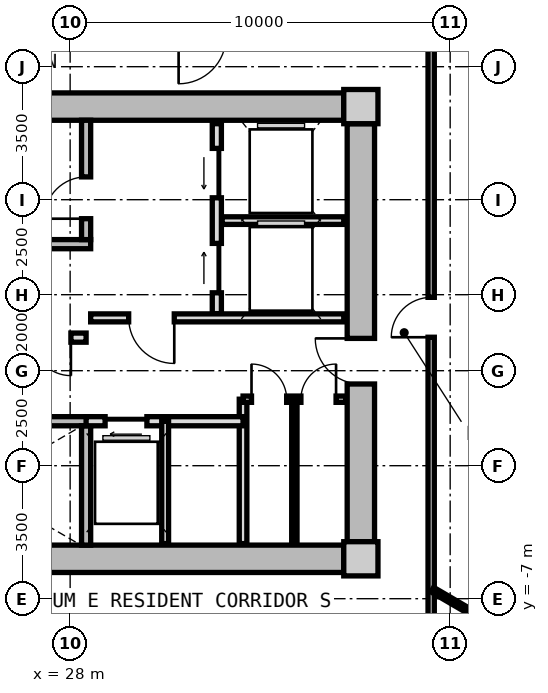
"""IFC4 building model, lengths in metres.
Left out: names, types, materials, properties, quantities, classifications, styles, units other than length and angle.
Written with IfcOpenShell. Run it as: python <this file> out.ifc"""

import sys

from ifc_helpers import new_model, si_unit, direction, frame, frame_2d, origin, origin_2d, place, context, subcontext, project, spatial, rectangle, extrude, source, transform, mapped, element, fill, save


model = new_model("IFC4")
c1 = context("Model", 3, precision=1e-05, world=origin(), true_north=direction((0.0, 1.0)))
c2 = subcontext(c1, "Body", "Model", "MODEL_VIEW")
j1 = project(units=[si_unit("LENGTHUNIT", "METRE"), si_unit("PLANEANGLEUNIT", "RADIAN")], contexts=[c1])
p1 = place(None, origin())
s1 = spatial("IfcSite", under=j1, at=p1, CompositionType="ELEMENT")
p2 = place(p1, origin())
s2 = spatial("IfcBuilding", under=s1, at=p2, CompositionType="ELEMENT")
p3 = place(p2, frame((0.0, 0.0, 105.4)))
s3 = spatial("IfcBuildingStorey", under=s2, at=p3, CompositionType="ELEMENT", Elevation=105.4)
m1 = source(origin(), c2, "Body", "SweptSolid", [
    extrude(rectangle(XDim=0.9, YDim=0.9, at=origin_2d()), origin(), (0.0, 0.0, 1.0), 3.05),
])
for number, where, z_axis, x_axis in (
    (1, (35.65, -5.95, 0.0), (0.0, 0.0, 1.0), (1.0, 0.0, 0.0)),
    (2, (35.65, 5.95, 0.0), (0.0, 0.0, 1.0), (1.0, 0.0, 0.0)),
):
    element("IfcColumn", number, at=place(p3, frame(where, z_axis=z_axis, x_axis=x_axis)), inside=s3, PredefinedType="COLUMN", context=c2, shape_type="MappedRepresentation", body=[
        mapped(m1, transform((0.0, 0.0, 0.0), x_axis=(1.0, 0.0, 0.0), y_axis=(0.0, 1.0, 0.0), z_axis=(0.0, 0.0, 1.0), scale=1.0)),
    ])
m2 = source(origin(), c2, "Body", "SweptSolid", [
    extrude(rectangle(XDim=14.4, YDim=0.72, at=frame_2d((7.2, 0.0))), origin(), (0.0, 0.0, 1.0), 2.79),
])
for number, where, z_axis, x_axis in (
    (3, (20.8, 5.95, 0.0), (0.0, 0.0, 1.0), (1.0, 0.0, 0.0)),
    (4, (35.2, -5.95, 0.0), (0.0, 0.0, 1.0), (-1.0, 0.0, 0.0)),
):
    element("IfcWall", number, at=place(p3, frame(where, z_axis=z_axis, x_axis=x_axis)), inside=s3, PredefinedType="SHEAR", context=c2, shape_type="MappedRepresentation", body=[
        mapped(m2, transform((0.0, 0.0, 0.0), x_axis=(1.0, 0.0, 0.0), y_axis=(0.0, 1.0, 0.0), z_axis=(0.0, 0.0, 1.0), scale=1.0)),
    ])
m3 = source(origin(), c2, "Body", "SweptSolid", [
    extrude(rectangle(XDim=11.0, YDim=0.72, at=frame_2d((5.5, 0.0))), origin(), (0.0, 0.0, 1.0), 2.79),
])
p4 = place(p3, frame((35.65, 5.5, 0.0), z_axis=(0.0, 0.0, 1.0), x_axis=(0.0, -1.0, 0.0)))
e5 = element("IfcWall", 5, at=p4, inside=s3, PredefinedType="SHEAR", context=c2, shape_type="MappedRepresentation", body=[
    mapped(m3, transform((0.0, 0.0, 0.0), x_axis=(1.0, 0.0, 0.0), y_axis=(0.0, 1.0, 0.0), z_axis=(0.0, 0.0, 1.0), scale=1.0)),
])
p5 = place(p4, frame((5.65, 0.0, 0.0)))
e6 = element("IfcOpeningElement", 6, at=p5, cuts=e5, PredefinedType="OPENING", context=c2, shape_type="SweptSolid", body=[
    extrude(rectangle(XDim=1.2, YDim=2.15, at=frame_2d((0.6, 1.075))), frame((0.0, 0.37, 0.0), z_axis=(0.0, -1.0, 0.0), x_axis=(1.0, 0.0, 0.0)), (0.0, 0.0, 1.0), 0.74),
])
m4 = source(origin(), c2, "Body", "SweptSolid", [
    extrude(rectangle(XDim=7.83, YDim=0.24, at=frame_2d((3.915, 0.0))), origin(), (0.0, 0.0, 1.0), 2.79),
])
p6 = place(p3, frame((20.71, 2.33, 0.0), z_axis=(0.0, 0.0, 1.0), x_axis=(1.0, 0.0, 0.0)))
e7 = element("IfcWall", 7, at=p6, inside=s3, PredefinedType="PARTITIONING", context=c2, shape_type="MappedRepresentation", body=[
    mapped(m4, transform((0.0, 0.0, 0.0), x_axis=(1.0, 0.0, 0.0), y_axis=(0.0, 1.0, 0.0), z_axis=(0.0, 0.0, 1.0), scale=1.0)),
])
m5 = source(origin(), c2, "Body", "SweptSolid", [
    extrude(rectangle(XDim=3.14, YDim=0.24, at=frame_2d((1.57, 0.0))), origin(), (0.0, 0.0, 1.0), 2.79),
])
p7 = place(p3, frame((28.42, 2.45, 0.0), z_axis=(0.0, 0.0, 1.0), x_axis=(0.0, 1.0, 0.0)))
e8 = element("IfcWall", 8, at=p7, inside=s3, PredefinedType="PARTITIONING", context=c2, shape_type="MappedRepresentation", body=[
    mapped(m5, transform((0.0, 0.0, 0.0), x_axis=(1.0, 0.0, 0.0), y_axis=(0.0, 1.0, 0.0), z_axis=(0.0, 0.0, 1.0), scale=1.0)),
])
p8 = place(p7, frame((0.55, 0.0, 0.0)))
e9 = element("IfcOpeningElement", 9, at=p8, cuts=e8, PredefinedType="OPENING", context=c2, shape_type="SweptSolid", body=[
    extrude(rectangle(XDim=1.1, YDim=2.15, at=frame_2d((0.55, 1.075))), frame((0.0, 0.13, 0.0), z_axis=(0.0, -1.0, 0.0), x_axis=(1.0, 0.0, 0.0)), (0.0, 0.0, 1.0), 0.26),
])
p9 = place(p3, frame((20.71, -2.33, 0.0), z_axis=(0.0, 0.0, 1.0), x_axis=(1.0, 0.0, 0.0)))
e10 = element("IfcWall", 10, at=p9, inside=s3, PredefinedType="PARTITIONING", context=c2, shape_type="MappedRepresentation", body=[
    mapped(m4, transform((0.0, 0.0, 0.0), x_axis=(1.0, 0.0, 0.0), y_axis=(0.0, 1.0, 0.0), z_axis=(0.0, 0.0, 1.0), scale=1.0)),
])
p10 = place(p9, frame((0.95, 0.0, 0.0)))
e11 = element("IfcOpeningElement", 11, at=p10, cuts=e10, PredefinedType="OPENING", context=c2, shape_type="SweptSolid", body=[
    extrude(rectangle(XDim=1.1, YDim=2.15, at=frame_2d((0.55, 1.075))), frame((0.0, 0.13, 0.0), z_axis=(0.0, -1.0, 0.0), x_axis=(1.0, 0.0, 0.0)), (0.0, 0.0, 1.0), 0.26),
])
p11 = place(p3, frame((28.42, -5.59, 0.0), z_axis=(0.0, 0.0, 1.0), x_axis=(0.0, 1.0, 0.0)))
e12 = element("IfcWall", 12, at=p11, inside=s3, PredefinedType="PARTITIONING", context=c2, shape_type="MappedRepresentation", body=[
    mapped(m5, transform((0.0, 0.0, 0.0), x_axis=(1.0, 0.0, 0.0), y_axis=(0.0, 1.0, 0.0), z_axis=(0.0, 0.0, 1.0), scale=1.0)),
])
m6 = source(origin(), c2, "Body", "SweptSolid", [
    extrude(rectangle(XDim=5.0, YDim=0.24, at=frame_2d((2.5, 0.0))), origin(), (0.0, 0.0, 1.0), 2.775),
])
p12 = place(p3, frame((31.86, 0.5, 0.0), z_axis=(0.0, 0.0, 1.0), x_axis=(0.0, 1.0, 0.0)))
e13 = element("IfcWall", 13, at=p12, inside=s3, PredefinedType="PARTITIONING", context=c2, shape_type="MappedRepresentation", body=[
    mapped(m6, transform((0.0, 0.0, 0.0), x_axis=(1.0, 0.0, 0.0), y_axis=(0.0, 1.0, 0.0), z_axis=(0.0, 0.0, 1.0), scale=1.0)),
])
p13 = place(p12, frame((3.05, 0.0, 0.0)))
e14 = element("IfcOpeningElement", 14, at=p13, cuts=e13, PredefinedType="OPENING", context=c2, shape_type="SweptSolid", body=[
    extrude(rectangle(XDim=1.3, YDim=2.2, at=frame_2d((0.65, 1.1))), frame((0.0, 0.13, 0.0), z_axis=(0.0, -1.0, 0.0), x_axis=(1.0, 0.0, 0.0)), (0.0, 0.0, 1.0), 0.26),
])
p14 = place(p12, frame((0.55, 0.0, 0.0)))
e15 = element("IfcOpeningElement", 15, at=p14, cuts=e13, PredefinedType="OPENING", context=c2, shape_type="SweptSolid", body=[
    extrude(rectangle(XDim=1.3, YDim=2.2, at=frame_2d((0.65, 1.1))), frame((0.0, 0.13, 0.0), z_axis=(0.0, -1.0, 0.0), x_axis=(1.0, 0.0, 0.0)), (0.0, 0.0, 1.0), 0.26),
])
m7 = source(origin(), c2, "Body", "SweptSolid", [
    extrude(rectangle(XDim=3.2, YDim=0.2, at=frame_2d((1.6, 0.0))), origin(), (0.0, 0.0, 1.0), 2.775),
])
p15 = place(p3, frame((32.0, 2.95, 0.0), z_axis=(0.0, 0.0, 1.0), x_axis=(1.0, 0.0, 0.0)))
e16 = element("IfcWall", 16, at=p15, inside=s3, PredefinedType="PARTITIONING", context=c2, shape_type="MappedRepresentation", body=[
    mapped(m7, transform((0.0, 0.0, 0.0), x_axis=(1.0, 0.0, 0.0), y_axis=(0.0, 1.0, 0.0), z_axis=(0.0, 0.0, 1.0), scale=1.0)),
])
m8 = source(origin(), c2, "Body", "SweptSolid", [
    extrude(rectangle(XDim=6.66, YDim=0.21, at=frame_2d((3.33, 0.0))), origin(), (0.0, 0.0, 1.0), 2.775),
])
p16 = place(p3, frame((28.54, 0.39, 0.0), z_axis=(0.0, 0.0, 1.0), x_axis=(1.0, 0.0, 0.0)))
e17 = element("IfcWall", 17, at=p16, inside=s3, PredefinedType="PARTITIONING", context=c2, shape_type="MappedRepresentation", body=[
    mapped(m8, transform((0.0, 0.0, 0.0), x_axis=(1.0, 0.0, 0.0), y_axis=(0.0, 1.0, 0.0), z_axis=(0.0, 0.0, 1.0), scale=1.0)),
])
p17 = place(p16, frame((1.0, 0.0, 0.0)))
e18 = element("IfcOpeningElement", 18, at=p17, cuts=e17, PredefinedType="OPENING", context=c2, shape_type="SweptSolid", body=[
    extrude(rectangle(XDim=1.2, YDim=2.15, at=frame_2d((0.6, 1.075))), frame((0.0, 0.115, 0.0), z_axis=(0.0, -1.0, 0.0), x_axis=(1.0, 0.0, 0.0)), (0.0, 0.0, 1.0), 0.23),
])
m9 = source(origin(), c2, "Body", "SweptSolid", [
    extrude(rectangle(XDim=7.62, YDim=0.24, at=frame_2d((3.81, 0.0))), origin(), (0.0, 0.0, 1.0), 2.775),
])
p18 = place(p3, frame((20.8, -0.13, 0.0), z_axis=(0.0, 0.0, 1.0), x_axis=(1.0, 0.0, 0.0)))
e19 = element("IfcWall", 19, at=p18, inside=s3, PredefinedType="PARTITIONING", context=c2, shape_type="MappedRepresentation", body=[
    mapped(m9, transform((0.0, 0.0, 0.0), x_axis=(1.0, 0.0, 0.0), y_axis=(0.0, 1.0, 0.0), z_axis=(0.0, 0.0, 1.0), scale=1.0)),
])
p19 = place(p18, frame((6.22, 0.0, 0.0)))
e20 = element("IfcOpeningElement", 20, at=p19, cuts=e19, PredefinedType="OPENING", context=c2, shape_type="SweptSolid", body=[
    extrude(rectangle(XDim=1.0, YDim=2.1, at=frame_2d((0.5, 1.05))), frame((0.0, 0.13, 0.0), z_axis=(0.0, -1.0, 0.0), x_axis=(1.0, 0.0, 0.0)), (0.0, 0.0, 1.0), 0.26),
])
p20 = place(p18, frame((2.4, 0.0, 0.0)))
e21 = element("IfcOpeningElement", 21, at=p20, cuts=e19, PredefinedType="OPENING", context=c2, shape_type="SweptSolid", body=[
    extrude(rectangle(XDim=1.0, YDim=2.1, at=frame_2d((0.5, 1.05))), frame((0.0, 0.13, 0.0), z_axis=(0.0, -1.0, 0.0), x_axis=(1.0, 0.0, 0.0)), (0.0, 0.0, 1.0), 0.26),
])
m10 = source(origin(), c2, "Body", "SweptSolid", [
    extrude(rectangle(XDim=3.8, YDim=0.2, at=frame_2d((1.9, 0.0))), origin(), (0.0, 0.0, 1.0), 2.775),
])
p21 = place(p3, frame((32.55, -5.55, 0.0), z_axis=(0.0, 0.0, 1.0), x_axis=(0.0, 1.0, 0.0)))
e22 = element("IfcWall", 22, at=p21, inside=s3, PredefinedType="PARTITIONING", context=c2, shape_type="MappedRepresentation", body=[
    mapped(m10, transform((0.0, 0.0, 0.0), x_axis=(1.0, 0.0, 0.0), y_axis=(0.0, 1.0, 0.0), z_axis=(0.0, 0.0, 1.0), scale=1.0)),
])
m11 = source(origin(), c2, "Body", "SweptSolid", [
    extrude(rectangle(XDim=4.13, YDim=0.24, at=frame_2d((2.065, 0.0))), origin(), (0.0, 0.0, 1.0), 2.775),
])
p22 = place(p3, frame((28.42, -2.33, 0.0), z_axis=(0.0, 0.0, 1.0), x_axis=(1.0, 0.0, 0.0)))
e23 = element("IfcWall", 23, at=p22, inside=s3, PredefinedType="PARTITIONING", context=c2, shape_type="MappedRepresentation", body=[
    mapped(m11, transform((0.0, 0.0, 0.0), x_axis=(1.0, 0.0, 0.0), y_axis=(0.0, 1.0, 0.0), z_axis=(0.0, 0.0, 1.0), scale=1.0)),
])
p23 = place(p22, frame((0.5, 0.0, 0.0)))
e24 = element("IfcOpeningElement", 24, at=p23, cuts=e23, PredefinedType="OPENING", context=c2, shape_type="SweptSolid", body=[
    extrude(rectangle(XDim=1.1, YDim=2.2, at=frame_2d((0.55, 1.1))), frame((0.0, 0.13, 0.0), z_axis=(0.0, -1.0, 0.0), x_axis=(1.0, 0.0, 0.0)), (0.0, 0.0, 1.0), 0.26),
])
m12 = source(origin(), c2, "Body", "SweptSolid", [
    extrude(rectangle(XDim=3.22, YDim=0.18, at=frame_2d((1.61, 0.0))), origin(), (0.0, 0.0, 1.0), 2.775),
])
p24 = place(p3, frame((30.5, -5.55, 0.0), z_axis=(0.0, 0.0, 1.0), x_axis=(0.0, 1.0, 0.0)))
e25 = element("IfcWall", 25, at=p24, inside=s3, PredefinedType="PARTITIONING", context=c2, shape_type="MappedRepresentation", body=[
    mapped(m12, transform((0.0, 0.0, 0.0), x_axis=(1.0, 0.0, 0.0), y_axis=(0.0, 1.0, 0.0), z_axis=(0.0, 0.0, 1.0), scale=1.0)),
])
m13 = source(origin(), c2, "Body", "SweptSolid", [
    extrude(rectangle(XDim=2.7, YDim=0.165, at=frame_2d((1.35, 0.0))), origin(), (0.0, 0.0, 1.0), 2.775),
])
p25 = place(p3, frame((32.55, -1.75, 0.0), z_axis=(0.0, 0.0, 1.0), x_axis=(1.0, 0.0, 0.0)))
e26 = element("IfcWall", 26, at=p25, inside=s3, PredefinedType="PARTITIONING", context=c2, shape_type="MappedRepresentation", body=[
    mapped(m13, transform((0.0, 0.0, 0.0), x_axis=(1.0, 0.0, 0.0), y_axis=(0.0, 1.0, 0.0), z_axis=(0.0, 0.0, 1.0), scale=1.0)),
])
p26 = place(p25, frame((0.222, 0.0, 0.0)))
e27 = element("IfcOpeningElement", 27, at=p26, cuts=e26, PredefinedType="OPENING", context=c2, shape_type="SweptSolid", body=[
    extrude(rectangle(XDim=0.925, YDim=2.1, at=frame_2d((0.462, 1.05))), frame((0.0, 0.093, 0.0), z_axis=(0.0, -1.0, 0.0), x_axis=(1.0, 0.0, 0.0)), (0.0, 0.0, 1.0), 0.185),
])
p27 = place(p25, frame((1.522, 0.0, 0.0)))
e28 = element("IfcOpeningElement", 28, at=p27, cuts=e26, PredefinedType="OPENING", context=c2, shape_type="SweptSolid", body=[
    extrude(rectangle(XDim=0.925, YDim=2.1, at=frame_2d((0.462, 1.05))), frame((0.0, 0.093, 0.0), z_axis=(0.0, -1.0, 0.0), x_axis=(1.0, 0.0, 0.0)), (0.0, 0.0, 1.0), 0.185),
])
m14 = source(origin(), c2, "Body", "SweptSolid", [
    extrude(rectangle(XDim=3.8, YDim=0.14, at=frame_2d((1.9, 0.0))), origin(), (0.0, 0.0, 1.0), 2.775),
])
p28 = place(p3, frame((33.9, -5.55, 0.0), z_axis=(0.0, 0.0, 1.0), x_axis=(0.0, 1.0, 0.0)))
e29 = element("IfcWall", 29, at=p28, inside=s3, PredefinedType="PARTITIONING", context=c2, shape_type="MappedRepresentation", body=[
    mapped(m14, transform((0.0, 0.0, 0.0), x_axis=(1.0, 0.0, 0.0), y_axis=(0.0, 1.0, 0.0), z_axis=(0.0, 0.0, 1.0), scale=1.0)),
])
m15 = source(origin(), c2, "Body", "SweptSolid", [
    extrude(rectangle(XDim=15.6, YDim=0.165, at=frame_2d((7.8, 0.0))), origin(), (0.0, 0.0, 1.0), 2.775),
])
p29 = place(p3, frame((37.5, 7.8, 0.0), z_axis=(0.0, 0.0, 1.0), x_axis=(0.0, -1.0, 0.0)))
e30 = element("IfcWall", 30, at=p29, inside=s3, PredefinedType="PARTITIONING", context=c2, shape_type="MappedRepresentation", body=[
    mapped(m15, transform((0.0, 0.0, 0.0), x_axis=(1.0, 0.0, 0.0), y_axis=(0.0, 1.0, 0.0), z_axis=(0.0, 0.0, 1.0), scale=1.0)),
])
p30 = place(p29, frame((6.87, 0.0, 0.0)))
e31 = element("IfcOpeningElement", 31, at=p30, cuts=e30, PredefinedType="OPENING", context=c2, shape_type="SweptSolid", body=[
    extrude(rectangle(XDim=1.05, YDim=2.15, at=frame_2d((0.525, 1.075))), frame((0.0, 0.093, 0.0), z_axis=(0.0, -1.0, 0.0), x_axis=(1.0, 0.0, 0.0)), (0.0, 0.0, 1.0), 0.185),
])
m16 = source(origin(), c2, "Body", "SweptSolid", [
    extrude(rectangle(XDim=7.618, YDim=0.115, at=frame_2d((3.809, 0.0))), origin(), (0.0, 0.0, 1.0), 2.775),
])
p31 = place(p3, frame((40.923, 3.749, 0.0), z_axis=(0.0, 0.0, 1.0), x_axis=(-0.534316104929, 0.845284744931, 0.0)))
e32 = element("IfcWall", 32, at=p31, inside=s3, PredefinedType="PARTITIONING", context=c2, shape_type="MappedRepresentation", body=[
    mapped(m16, transform((0.0, 0.0, 0.0), x_axis=(1.0, 0.0, 0.0), y_axis=(0.0, 1.0, 0.0), z_axis=(0.0, 0.0, 1.0), scale=1.0)),
])
p32 = place(p31, frame((3.334, 0.0, 0.0)))
e33 = element("IfcOpeningElement", 33, at=p32, cuts=e32, PredefinedType="OPENING", context=c2, shape_type="SweptSolid", body=[
    extrude(rectangle(XDim=0.95, YDim=2.1, at=frame_2d((0.475, 1.05))), frame((0.0, 0.067, 0.0), z_axis=(0.0, -1.0, 0.0), x_axis=(1.0, 0.0, 0.0)), (0.0, 0.0, 1.0), 0.135),
])
m17 = source(origin(), c2, "Body", "SweptSolid", [
    extrude(rectangle(XDim=1.407, YDim=0.14, at=frame_2d((0.704, 0.0))), origin(), (0.0, 0.0, 1.0), 2.775),
])
p33 = place(p3, frame((37.53, -6.762, 0.0), z_axis=(0.0, 0.0, 1.0), x_axis=(0.863539718977, -0.504280828258, 0.0)))
e34 = element("IfcWall", 34, at=p33, inside=s3, PredefinedType="PARTITIONING", context=c2, shape_type="MappedRepresentation", body=[
    mapped(m17, transform((0.0, 0.0, 0.0), x_axis=(1.0, 0.0, 0.0), y_axis=(0.0, 1.0, 0.0), z_axis=(0.0, 0.0, 1.0), scale=1.0)),
])
m18 = source(origin(), c2, "Body", "SweptSolid", [
    extrude(rectangle(XDim=1.1, YDim=2.15, at=frame_2d((0.55, 1.075))), frame((0.0, 0.025, 0.0), z_axis=(0.0, -1.0, 0.0), x_axis=(1.0, 0.0, 0.0)), (0.0, 0.0, 1.0), 0.05),
])
p34 = place(p8, origin())
e35 = element("IfcDoor", 35, at=p34, inside=s3, OperationType="SINGLE_SWING_LEFT", PredefinedType="DOOR", context=c2, shape_type="MappedRepresentation", body=[
    mapped(m18, transform((0.0, 0.0, 0.0), x_axis=(1.0, 0.0, 0.0), y_axis=(0.0, 1.0, 0.0), z_axis=(0.0, 0.0, 1.0), scale=1.0)),
])
fill(e9, e35)
m19 = source(origin(), c2, "Body", "SweptSolid", [
    extrude(rectangle(XDim=1.3, YDim=2.2, at=frame_2d((0.65, 1.1))), frame((0.0, 0.025, 0.0), z_axis=(0.0, -1.0, 0.0), x_axis=(1.0, 0.0, 0.0)), (0.0, 0.0, 1.0), 0.05),
])
p35 = place(p13, origin())
e36 = element("IfcDoor", 36, at=p35, inside=s3, OperationType="SLIDING_TO_LEFT", PredefinedType="DOOR", context=c2, shape_type="MappedRepresentation", body=[
    mapped(m19, transform((0.0, 0.0, 0.0), x_axis=(1.0, 0.0, 0.0), y_axis=(0.0, 1.0, 0.0), z_axis=(0.0, 0.0, 1.0), scale=1.0)),
])
fill(e14, e36)
p36 = place(p14, origin())
e37 = element("IfcDoor", 37, at=p36, inside=s3, OperationType="SLIDING_TO_RIGHT", PredefinedType="DOOR", context=c2, shape_type="MappedRepresentation", body=[
    mapped(m19, transform((0.0, 0.0, 0.0), x_axis=(1.0, 0.0, 0.0), y_axis=(0.0, 1.0, 0.0), z_axis=(0.0, 0.0, 1.0), scale=1.0)),
])
fill(e15, e37)
m20 = source(origin(), c2, "Body", "SweptSolid", [
    extrude(rectangle(XDim=1.2, YDim=2.15, at=frame_2d((0.6, 1.075))), frame((0.0, 0.025, 0.0), z_axis=(0.0, -1.0, 0.0), x_axis=(1.0, 0.0, 0.0)), (0.0, 0.0, 1.0), 0.05),
])
p37 = place(p17, frame((1.2, 0.0, 0.0), z_axis=(0.0, 0.0, 1.0), x_axis=(-1.0, 0.0, 0.0)))
e38 = element("IfcDoor", 38, at=p37, inside=s3, OperationType="SINGLE_SWING_LEFT", PredefinedType="DOOR", context=c2, shape_type="MappedRepresentation", body=[
    mapped(m20, transform((0.0, 0.0, 0.0), x_axis=(1.0, 0.0, 0.0), y_axis=(0.0, 1.0, 0.0), z_axis=(0.0, 0.0, 1.0), scale=1.0)),
])
fill(e18, e38)
p38 = place(p5, frame((1.2, 0.0, 0.0), z_axis=(0.0, 0.0, 1.0), x_axis=(-1.0, 0.0, 0.0)))
e39 = element("IfcDoor", 39, at=p38, inside=s3, OperationType="SINGLE_SWING_RIGHT", PredefinedType="DOOR", context=c2, shape_type="MappedRepresentation", body=[
    mapped(m20, transform((0.0, 0.0, 0.0), x_axis=(1.0, 0.0, 0.0), y_axis=(0.0, 1.0, 0.0), z_axis=(0.0, 0.0, 1.0), scale=1.0)),
])
fill(e6, e39)
m21 = source(origin(), c2, "Body", "SweptSolid", [
    extrude(rectangle(XDim=1.0, YDim=2.1, at=frame_2d((0.5, 1.05))), frame((0.0, 0.025, 0.0), z_axis=(0.0, -1.0, 0.0), x_axis=(1.0, 0.0, 0.0)), (0.0, 0.0, 1.0), 0.05),
])
p39 = place(p19, frame((1.0, 0.0, 0.0), z_axis=(0.0, 0.0, 1.0), x_axis=(-1.0, 0.0, 0.0)))
e40 = element("IfcDoor", 40, at=p39, inside=s3, OperationType="SINGLE_SWING_LEFT", PredefinedType="DOOR", context=c2, shape_type="MappedRepresentation", body=[
    mapped(m21, transform((0.0, 0.0, 0.0), x_axis=(1.0, 0.0, 0.0), y_axis=(0.0, 1.0, 0.0), z_axis=(0.0, 0.0, 1.0), scale=1.0)),
])
fill(e20, e40)
m22 = source(origin(), c2, "Body", "SweptSolid", [
    extrude(rectangle(XDim=1.1, YDim=2.2, at=frame_2d((0.55, 1.1))), frame((0.0, 0.025, 0.0), z_axis=(0.0, -1.0, 0.0), x_axis=(1.0, 0.0, 0.0)), (0.0, 0.0, 1.0), 0.05),
])
p40 = place(p23, frame((1.1, 0.0, 0.0), z_axis=(0.0, 0.0, 1.0), x_axis=(-1.0, 0.0, 0.0)))
e41 = element("IfcDoor", 41, at=p40, inside=s3, OperationType="SLIDING_TO_LEFT", PredefinedType="DOOR", context=c2, shape_type="MappedRepresentation", body=[
    mapped(m22, transform((0.0, 0.0, 0.0), x_axis=(1.0, 0.0, 0.0), y_axis=(0.0, 1.0, 0.0), z_axis=(0.0, 0.0, 1.0), scale=1.0)),
])
fill(e24, e41)
m23 = source(origin(), c2, "Body", "SweptSolid", [
    extrude(rectangle(XDim=0.925, YDim=2.1, at=frame_2d((0.462, 1.05))), frame((0.0, 0.025, 0.0), z_axis=(0.0, -1.0, 0.0), x_axis=(1.0, 0.0, 0.0)), (0.0, 0.0, 1.0), 0.05),
])
p41 = place(p26, origin())
e42 = element("IfcDoor", 42, at=p41, inside=s3, OperationType="SINGLE_SWING_LEFT", PredefinedType="DOOR", context=c2, shape_type="MappedRepresentation", body=[
    mapped(m23, transform((0.0, 0.0, 0.0), x_axis=(1.0, 0.0, 0.0), y_axis=(0.0, 1.0, 0.0), z_axis=(0.0, 0.0, 1.0), scale=1.0)),
])
fill(e27, e42)
p42 = place(p27, origin())
e43 = element("IfcDoor", 43, at=p42, inside=s3, OperationType="SINGLE_SWING_RIGHT", PredefinedType="DOOR", context=c2, shape_type="MappedRepresentation", body=[
    mapped(m23, transform((0.0, 0.0, 0.0), x_axis=(1.0, 0.0, 0.0), y_axis=(0.0, 1.0, 0.0), z_axis=(0.0, 0.0, 1.0), scale=1.0)),
])
fill(e28, e43)
m24 = source(origin(), c2, "Body", "SweptSolid", [
    extrude(rectangle(XDim=1.05, YDim=2.15, at=frame_2d((0.525, 1.075))), frame((0.0, 0.025, 0.0), z_axis=(0.0, -1.0, 0.0), x_axis=(1.0, 0.0, 0.0)), (0.0, 0.0, 1.0), 0.05),
])
p43 = place(p30, frame((1.05, 0.0, 0.0), z_axis=(0.0, 0.0, 1.0), x_axis=(-1.0, 0.0, 0.0)))
e44 = element("IfcDoor", 44, at=p43, inside=s3, OperationType="SINGLE_SWING_LEFT", PredefinedType="DOOR", context=c2, shape_type="MappedRepresentation", body=[
    mapped(m24, transform((0.0, 0.0, 0.0), x_axis=(1.0, 0.0, 0.0), y_axis=(0.0, 1.0, 0.0), z_axis=(0.0, 0.0, 1.0), scale=1.0)),
])
fill(e31, e44)
save(model, sys.argv[1])
